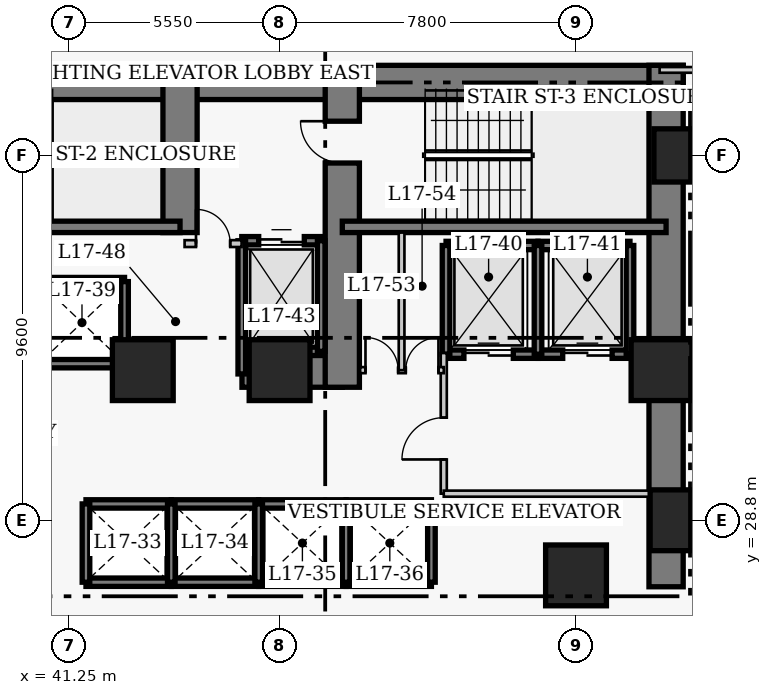
"""IFC4 building model, lengths in metres.
Left out: names, types, materials, properties, quantities, classifications, styles, units other than length and angle.
Written with IfcOpenShell. Run it as: python <this file> out.ifc"""

import sys

from ifc_helpers import new_model, si_unit, direction, frame, frame_2d, origin, origin_2d, place, context, subcontext, project, spatial, rectangle, extrude, element, fill, save


model = new_model("IFC4")
c1 = context("Model", 3, precision=1e-05, world=origin(), true_north=direction((0.0, 1.0)))
c2 = subcontext(c1, "Body", "Model", "MODEL_VIEW")
j1 = project(units=[si_unit("LENGTHUNIT", "METRE"), si_unit("PLANEANGLEUNIT", "RADIAN")], contexts=[c1])
p1 = place(None, origin())
s1 = spatial("IfcSite", under=j1, at=p1, CompositionType="ELEMENT")
p2 = place(p1, origin())
s2 = spatial("IfcBuilding", under=s1, at=p2, CompositionType="ELEMENT")
p3 = place(p2, frame((0.0, 0.0, 71.6)))
s3 = spatial("IfcBuildingStorey", under=s2, at=p3, CompositionType="ELEMENT", Elevation=71.6)
p4 = place(p3, frame((35.85, 40.32, 0.0), z_axis=(0.0, 0.0, 1.0), x_axis=(1.0, 0.0, 0.0)))
e1 = element("IfcWall", 1, at=p4, inside=s3, PredefinedType="SHEAR", context=c2, shape_type="SweptSolid", body=[
    extrude(rectangle(XDim=12.6, YDim=0.9, at=frame_2d((6.3, 0.0))), origin(), (0.0, 0.0, 1.0), 3.8),
])
p5 = place(p3, frame((48.45, 40.32, 0.0), z_axis=(0.0, 0.0, 1.0), x_axis=(1.0, 0.0, 0.0)))
e2 = element("IfcWall", 2, at=p5, inside=s3, PredefinedType="SHEAR", context=c2, shape_type="SweptSolid", body=[
    extrude(rectangle(XDim=8.97, YDim=0.9, at=frame_2d((4.485, 0.0))), origin(), (0.0, 0.0, 1.0), 3.8),
])
p6 = place(p3, frame((56.97, 27.05, 0.0), z_axis=(0.0, 0.0, 1.0), x_axis=(0.0, 1.0, 0.0)))
e3 = element("IfcWall", 3, at=p6, inside=s3, PredefinedType="SHEAR", context=c2, shape_type="SweptSolid", body=[
    extrude(rectangle(XDim=13.72, YDim=0.9, at=frame_2d((6.86, 0.0))), origin(), (0.0, 0.0, 1.0), 3.8),
])
p7 = place(p3, frame((45.81, 32.75, 0.0), z_axis=(0.0, 0.0, 1.0), x_axis=(1.0, 0.0, 0.0)))
e4 = element("IfcWall", 4, at=p7, inside=s3, PredefinedType="SHEAR", context=c2, shape_type="SweptSolid", body=[
    extrude(rectangle(XDim=2.64, YDim=0.9, at=frame_2d((1.32, 0.0))), origin(), (0.0, 0.0, 1.0), 3.8),
])
p8 = place(p3, frame((44.18, 36.37, 0.0), z_axis=(0.0, 0.0, 1.0), x_axis=(0.0, 1.0, 0.0)))
e5 = element("IfcWall", 5, at=p8, inside=s3, PredefinedType="SHEAR", context=c2, shape_type="SweptSolid", body=[
    extrude(rectangle(XDim=3.95, YDim=0.9, at=frame_2d((1.975, 0.0))), origin(), (0.0, 0.0, 1.0), 3.8),
])
p9 = place(p3, frame((48.45, 32.3, 0.0), z_axis=(0.0, 0.0, 1.0), x_axis=(0.0, 1.0, 0.0)))
e6 = element("IfcWall", 6, at=p9, inside=s3, PredefinedType="SHEAR", context=c2, shape_type="SweptSolid", body=[
    extrude(rectangle(XDim=8.02, YDim=0.9, at=frame_2d((4.01, 0.0))), origin(), (0.0, 0.0, 1.0), 3.8),
])
p10 = place(p9, frame((5.9, 0.0, 0.0)))
e7 = element("IfcOpeningElement", 7, at=p10, cuts=e6, PredefinedType="OPENING", context=c2, shape_type="SweptSolid", body=[
    extrude(rectangle(XDim=1.1, YDim=2.15, at=frame_2d((0.55, 1.075))), frame((0.0, 0.46, 0.0), z_axis=(0.0, -1.0, 0.0), x_axis=(1.0, 0.0, 0.0)), (0.0, 0.0, 1.0), 0.92),
])
p11 = place(p3, frame((35.85, 36.52, 0.0), z_axis=(0.0, 0.0, 1.0), x_axis=(1.0, 0.0, 0.0)))
e8 = element("IfcWall", 8, at=p11, inside=s3, PredefinedType="SHEAR", context=c2, shape_type="SweptSolid", body=[
    extrude(rectangle(XDim=8.33, YDim=0.3, at=frame_2d((4.165, 0.0))), origin(), (0.0, 0.0, 1.0), 3.8),
])
p12 = place(p3, frame((48.45, 36.52, 0.0), z_axis=(0.0, 0.0, 1.0), x_axis=(1.0, 0.0, 0.0)))
e9 = element("IfcWall", 9, at=p12, inside=s3, PredefinedType="SHEAR", context=c2, shape_type="SweptSolid", body=[
    extrude(rectangle(XDim=8.52, YDim=0.3, at=frame_2d((4.26, 0.0))), origin(), (0.0, 0.0, 1.0), 3.8),
])
p13 = place(p3, frame((57.35, 28.8, 0.0), z_axis=(0.0, 0.0, 1.0), x_axis=(1.0, 0.0, 0.0)))
e10 = element("IfcColumn", 10, at=p13, inside=s3, PredefinedType="COLUMN", context=c2, shape_type="SweptSolid", body=[
    extrude(rectangle(XDim=1.6, YDim=1.6, at=origin_2d()), origin(), (0.0, 0.0, 1.0), 3.8),
])
p14 = place(p3, frame((57.35, 38.4, 0.0), z_axis=(0.0, 0.0, 1.0), x_axis=(1.0, 0.0, 0.0)))
e11 = element("IfcColumn", 11, at=p14, inside=s3, PredefinedType="COLUMN", context=c2, shape_type="SweptSolid", body=[
    extrude(rectangle(XDim=1.4, YDim=1.4, at=origin_2d()), origin(), (0.0, 0.0, 1.0), 3.8),
])
for number, where, z_axis, x_axis in (
    (12, (43.2, 32.75, 0.0), (0.0, 0.0, 1.0), (1.0, 0.0, 0.0)),
    (13, (46.8, 32.75, 0.0), (0.0, 0.0, 1.0), (1.0, 0.0, 0.0)),
    (14, (54.6, 27.35, 0.0), (0.0, 0.0, 1.0), (1.0, 0.0, 0.0)),
    (15, (56.85, 32.75, 0.0), (0.0, 0.0, 1.0), (1.0, 0.0, 0.0)),
):
    element("IfcColumn", number, at=place(p3, frame(where, z_axis=z_axis, x_axis=x_axis)), inside=s3, PredefinedType="COLUMN", context=c2, shape_type="SweptSolid", body=[
        extrude(rectangle(XDim=1.6, YDim=1.6, at=origin_2d()), origin(), (0.0, 0.0, 1.0), 3.8),
    ])
for number, where, z_axis, x_axis in (
    (16, (41.705, 29.23, 0.0), (0.0, 0.0, 1.0), (1.0, 0.0, 0.0)),
    (17, (41.705, 27.17, 0.0), (0.0, 0.0, 1.0), (1.0, 0.0, 0.0)),
):
    element("IfcWall", number, at=place(p3, frame(where, z_axis=z_axis, x_axis=x_axis)), inside=s3, PredefinedType="SHEAR", context=c2, shape_type="SweptSolid", body=[
        extrude(rectangle(XDim=2.245, YDim=0.22, at=frame_2d((1.123, 0.0))), origin(), (0.0, 0.0, 1.0), 3.8),
    ])
p15 = place(p3, frame((41.705, 27.17, 0.0), z_axis=(0.0, 0.0, 1.0), x_axis=(0.0, 1.0, 0.0)))
e18 = element("IfcWall", 18, at=p15, inside=s3, PredefinedType="SHEAR", context=c2, shape_type="SweptSolid", body=[
    extrude(rectangle(XDim=2.06, YDim=0.2, at=frame_2d((1.03, 0.0))), origin(), (0.0, 0.0, 1.0), 3.8),
])
for number, where, z_axis, x_axis in (
    (19, (43.95, 29.23, 0.0), (0.0, 0.0, 1.0), (1.0, 0.0, 0.0)),
    (20, (43.95, 27.17, 0.0), (0.0, 0.0, 1.0), (1.0, 0.0, 0.0)),
):
    element("IfcWall", number, at=place(p3, frame(where, z_axis=z_axis, x_axis=x_axis)), inside=s3, PredefinedType="SHEAR", context=c2, shape_type="SweptSolid", body=[
        extrude(rectangle(XDim=2.3, YDim=0.22, at=frame_2d((1.15, 0.0))), origin(), (0.0, 0.0, 1.0), 3.8),
    ])
p16 = place(p3, frame((43.95, 27.17, 0.0), z_axis=(0.0, 0.0, 1.0), x_axis=(0.0, 1.0, 0.0)))
e21 = element("IfcWall", 21, at=p16, inside=s3, PredefinedType="SHEAR", context=c2, shape_type="SweptSolid", body=[
    extrude(rectangle(XDim=2.06, YDim=0.2, at=frame_2d((1.03, 0.0))), origin(), (0.0, 0.0, 1.0), 3.8),
])
for number, where, z_axis, x_axis in (
    (22, (46.25, 29.23, 0.0), (0.0, 0.0, 1.0), (1.0, 0.0, 0.0)),
    (23, (46.25, 27.17, 0.0), (0.0, 0.0, 1.0), (1.0, 0.0, 0.0)),
):
    element("IfcWall", number, at=place(p3, frame(where, z_axis=z_axis, x_axis=x_axis)), inside=s3, PredefinedType="SHEAR", context=c2, shape_type="SweptSolid", body=[
        extrude(rectangle(XDim=2.3, YDim=0.22, at=frame_2d((1.15, 0.0))), origin(), (0.0, 0.0, 1.0), 3.8),
    ])
p17 = place(p3, frame((46.25, 27.17, 0.0), z_axis=(0.0, 0.0, 1.0), x_axis=(0.0, 1.0, 0.0)))
e24 = element("IfcWall", 24, at=p17, inside=s3, PredefinedType="SHEAR", context=c2, shape_type="SweptSolid", body=[
    extrude(rectangle(XDim=2.06, YDim=0.2, at=frame_2d((1.03, 0.0))), origin(), (0.0, 0.0, 1.0), 3.8),
])
for number, where, z_axis, x_axis in (
    (25, (48.55, 29.23, 0.0), (0.0, 0.0, 1.0), (1.0, 0.0, 0.0)),
    (26, (48.55, 27.17, 0.0), (0.0, 0.0, 1.0), (1.0, 0.0, 0.0)),
):
    element("IfcWall", number, at=place(p3, frame(where, z_axis=z_axis, x_axis=x_axis)), inside=s3, PredefinedType="SHEAR", context=c2, shape_type="SweptSolid", body=[
        extrude(rectangle(XDim=2.245, YDim=0.22, at=frame_2d((1.123, 0.0))), origin(), (0.0, 0.0, 1.0), 3.8),
    ])
for number, where, z_axis, x_axis in (
    (27, (48.55, 27.17, 0.0), (0.0, 0.0, 1.0), (0.0, 1.0, 0.0)),
    (28, (50.795, 27.17, 0.0), (0.0, 0.0, 1.0), (0.0, 1.0, 0.0)),
):
    element("IfcWall", number, at=place(p3, frame(where, z_axis=z_axis, x_axis=x_axis)), inside=s3, PredefinedType="SHEAR", context=c2, shape_type="SweptSolid", body=[
        extrude(rectangle(XDim=2.06, YDim=0.2, at=frame_2d((1.03, 0.0))), origin(), (0.0, 0.0, 1.0), 3.8),
    ])
for number, where, z_axis, x_axis in (
    (29, (40.4, 35.08, 0.0), (0.0, 0.0, 1.0), (1.0, 0.0, 0.0)),
    (30, (40.4, 32.92, 0.0), (0.0, 0.0, 1.0), (1.0, 0.0, 0.0)),
):
    element("IfcWall", number, at=place(p3, frame(where, z_axis=z_axis, x_axis=x_axis)), inside=s3, PredefinedType="SHEAR", context=c2, shape_type="SweptSolid", body=[
        extrude(rectangle(XDim=2.32, YDim=0.22, at=frame_2d((1.16, 0.0))), origin(), (0.0, 0.0, 1.0), 3.8),
    ])
p18 = place(p3, frame((42.72, 32.92, 0.0), z_axis=(0.0, 0.0, 1.0), x_axis=(0.0, 1.0, 0.0)))
e31 = element("IfcWall", 31, at=p18, inside=s3, PredefinedType="SHEAR", context=c2, shape_type="SweptSolid", body=[
    extrude(rectangle(XDim=2.16, YDim=0.2, at=frame_2d((1.08, 0.0))), origin(), (0.0, 0.0, 1.0), 3.8),
])
p19 = place(p3, frame((51.18, 36.03, 0.0), z_axis=(0.0, 0.0, 1.0), x_axis=(1.0, 0.0, 0.0)))
e32 = element("IfcWall", 32, at=p19, inside=s3, PredefinedType="SHEAR", context=c2, shape_type="SweptSolid", body=[
    extrude(rectangle(XDim=2.42, YDim=0.22, at=frame_2d((1.21, 0.0))), origin(), (0.0, 0.0, 1.0), 3.8),
])
p20 = place(p3, frame((51.18, 33.17, 0.0), z_axis=(0.0, 0.0, 1.0), x_axis=(1.0, 0.0, 0.0)))
e33 = element("IfcWall", 33, at=p20, inside=s3, PredefinedType="SHEAR", context=c2, shape_type="SweptSolid", body=[
    extrude(rectangle(XDim=2.42, YDim=0.22, at=frame_2d((1.21, 0.0))), origin(), (0.0, 0.0, 1.0), 3.8),
])
p21 = place(p20, frame((0.47, 0.0, 0.0)))
e34 = element("IfcOpeningElement", 34, at=p21, cuts=e33, PredefinedType="OPENING", context=c2, shape_type="SweptSolid", body=[
    extrude(rectangle(XDim=1.3, YDim=2.15, at=frame_2d((0.65, 1.075))), frame((0.0, 0.12, 0.0), z_axis=(0.0, -1.0, 0.0), x_axis=(1.0, 0.0, 0.0)), (0.0, 0.0, 1.0), 0.24),
])
p22 = place(p3, frame((51.18, 33.17, 0.0), z_axis=(0.0, 0.0, 1.0), x_axis=(0.0, 1.0, 0.0)))
e35 = element("IfcWall", 35, at=p22, inside=s3, PredefinedType="SHEAR", context=c2, shape_type="SweptSolid", body=[
    extrude(rectangle(XDim=2.86, YDim=0.2, at=frame_2d((1.43, 0.0))), origin(), (0.0, 0.0, 1.0), 3.8),
])
p23 = place(p3, frame((53.6, 36.03, 0.0), z_axis=(0.0, 0.0, 1.0), x_axis=(1.0, 0.0, 0.0)))
e36 = element("IfcWall", 36, at=p23, inside=s3, PredefinedType="SHEAR", context=c2, shape_type="SweptSolid", body=[
    extrude(rectangle(XDim=2.42, YDim=0.22, at=frame_2d((1.21, 0.0))), origin(), (0.0, 0.0, 1.0), 3.8),
])
p24 = place(p3, frame((53.6, 33.17, 0.0), z_axis=(0.0, 0.0, 1.0), x_axis=(1.0, 0.0, 0.0)))
e37 = element("IfcWall", 37, at=p24, inside=s3, PredefinedType="SHEAR", context=c2, shape_type="SweptSolid", body=[
    extrude(rectangle(XDim=2.42, YDim=0.22, at=frame_2d((1.21, 0.0))), origin(), (0.0, 0.0, 1.0), 3.8),
])
p25 = place(p24, frame((0.65, 0.0, 0.0)))
e38 = element("IfcOpeningElement", 38, at=p25, cuts=e37, PredefinedType="OPENING", context=c2, shape_type="SweptSolid", body=[
    extrude(rectangle(XDim=1.3, YDim=2.15, at=frame_2d((0.65, 1.075))), frame((0.0, 0.12, 0.0), z_axis=(0.0, -1.0, 0.0), x_axis=(1.0, 0.0, 0.0)), (0.0, 0.0, 1.0), 0.24),
])
for number, where, z_axis, x_axis in (
    (39, (53.6, 33.17, 0.0), (0.0, 0.0, 1.0), (0.0, 1.0, 0.0)),
    (40, (56.02, 33.17, 0.0), (0.0, 0.0, 1.0), (0.0, 1.0, 0.0)),
):
    element("IfcWall", number, at=place(p3, frame(where, z_axis=z_axis, x_axis=x_axis)), inside=s3, PredefinedType="SHEAR", context=c2, shape_type="SweptSolid", body=[
        extrude(rectangle(XDim=2.86, YDim=0.2, at=frame_2d((1.43, 0.0))), origin(), (0.0, 0.0, 1.0), 3.8),
    ])
p26 = place(p3, frame((45.805, 36.155, 0.0), z_axis=(0.0, 0.0, 1.0), x_axis=(1.0, 0.0, 0.0)))
e41 = element("IfcWall", 41, at=p26, inside=s3, PredefinedType="SHEAR", context=c2, shape_type="SweptSolid", body=[
    extrude(rectangle(XDim=2.09, YDim=0.22, at=frame_2d((1.045, 0.0))), origin(), (0.0, 0.0, 1.0), 3.8),
])
p27 = place(p26, frame((0.445, 0.0, 0.0)))
e42 = element("IfcOpeningElement", 42, at=p27, cuts=e41, PredefinedType="OPENING", context=c2, shape_type="SweptSolid", body=[
    extrude(rectangle(XDim=1.2, YDim=2.15, at=frame_2d((0.6, 1.075))), frame((0.0, 0.12, 0.0), z_axis=(0.0, -1.0, 0.0), x_axis=(1.0, 0.0, 0.0)), (0.0, 0.0, 1.0), 0.24),
])
p28 = place(p3, frame((45.805, 33.245, 0.0), z_axis=(0.0, 0.0, 1.0), x_axis=(1.0, 0.0, 0.0)))
e43 = element("IfcWall", 43, at=p28, inside=s3, PredefinedType="SHEAR", context=c2, shape_type="SweptSolid", body=[
    extrude(rectangle(XDim=2.09, YDim=0.22, at=frame_2d((1.045, 0.0))), origin(), (0.0, 0.0, 1.0), 3.8),
])
p29 = place(p3, frame((45.805, 32.65, 0.0), z_axis=(0.0, 0.0, 1.0), x_axis=(0.0, 1.0, 0.0)))
e44 = element("IfcWall", 44, at=p29, inside=s3, PredefinedType="SHEAR", context=c2, shape_type="SweptSolid", body=[
    extrude(rectangle(XDim=3.505, YDim=0.2, at=frame_2d((1.752, 0.0))), origin(), (0.0, 0.0, 1.0), 3.8),
])
p30 = place(p3, frame((47.895, 33.245, 0.0), z_axis=(0.0, 0.0, 1.0), x_axis=(0.0, 1.0, 0.0)))
e45 = element("IfcWall", 45, at=p30, inside=s3, PredefinedType="SHEAR", context=c2, shape_type="SweptSolid", body=[
    extrude(rectangle(XDim=2.91, YDim=0.2, at=frame_2d((1.455, 0.0))), origin(), (0.0, 0.0, 1.0), 3.8),
])
p31 = place(p3, frame((44.3, 36.08, 0.0), z_axis=(0.0, 0.0, 1.0), x_axis=(1.0, 0.0, 0.0)))
e46 = element("IfcWall", 46, at=p31, inside=s3, PredefinedType="PARTITIONING", context=c2, shape_type="SweptSolid", body=[
    extrude(rectangle(XDim=1.5, YDim=0.18, at=frame_2d((0.75, 0.0))), origin(), (0.0, 0.0, 1.0), 3.42),
])
p32 = place(p31, frame((0.3, 0.0, 0.0)))
e47 = element("IfcOpeningElement", 47, at=p32, cuts=e46, PredefinedType="OPENING", context=c2, shape_type="SweptSolid", body=[
    extrude(rectangle(XDim=0.9, YDim=2.15, at=frame_2d((0.45, 1.075))), frame((0.0, 0.1, 0.0), z_axis=(0.0, -1.0, 0.0), x_axis=(1.0, 0.0, 0.0)), (0.0, 0.0, 1.0), 0.2),
])
p33 = place(p3, frame((51.12, 29.5, 0.0), z_axis=(0.0, 0.0, 1.0), x_axis=(0.0, 1.0, 0.0)))
e48 = element("IfcWall", 48, at=p33, inside=s3, PredefinedType="PARTITIONING", context=c2, shape_type="SweptSolid", body=[
    extrude(rectangle(XDim=3.7, YDim=0.16, at=frame_2d((1.85, 0.0))), origin(), (0.0, 0.0, 1.0), 3.42),
])
p34 = place(p33, frame((0.9, 0.0, 0.0)))
e49 = element("IfcOpeningElement", 49, at=p34, cuts=e48, PredefinedType="OPENING", context=c2, shape_type="SweptSolid", body=[
    extrude(rectangle(XDim=1.1, YDim=2.15, at=frame_2d((0.55, 1.075))), frame((0.0, 0.09, 0.0), z_axis=(0.0, -1.0, 0.0), x_axis=(1.0, 0.0, 0.0)), (0.0, 0.0, 1.0), 0.18),
])
p35 = place(p3, frame((51.12, 29.5, 0.0), z_axis=(0.0, 0.0, 1.0), x_axis=(1.0, 0.0, 0.0)))
e50 = element("IfcWall", 50, at=p35, inside=s3, PredefinedType="PARTITIONING", context=c2, shape_type="SweptSolid", body=[
    extrude(rectangle(XDim=5.63, YDim=0.16, at=frame_2d((2.815, 0.0))), origin(), (0.0, 0.0, 1.0), 3.42),
])
p36 = place(p3, frame((48.92, 32.75, 0.0), z_axis=(0.0, 0.0, 1.0), x_axis=(1.0, 0.0, 0.0)))
e51 = element("IfcWall", 51, at=p36, inside=s3, PredefinedType="PARTITIONING", context=c2, shape_type="SweptSolid", body=[
    extrude(rectangle(XDim=2.2, YDim=0.16, at=frame_2d((1.1, 0.0))), origin(), (0.0, 0.0, 1.0), 3.42),
])
p37 = place(p36, frame((0.14, 0.0, 0.0)))
e52 = element("IfcOpeningElement", 52, at=p37, cuts=e51, PredefinedType="OPENING", context=c2, shape_type="SweptSolid", body=[
    extrude(rectangle(XDim=0.86, YDim=2.05, at=frame_2d((0.43, 1.025))), frame((0.0, 0.09, 0.0), z_axis=(0.0, -1.0, 0.0), x_axis=(1.0, 0.0, 0.0)), (0.0, 0.0, 1.0), 0.18),
])
p38 = place(p36, frame((1.2, 0.0, 0.0)))
e53 = element("IfcOpeningElement", 53, at=p38, cuts=e51, PredefinedType="OPENING", context=c2, shape_type="SweptSolid", body=[
    extrude(rectangle(XDim=0.86, YDim=2.05, at=frame_2d((0.43, 1.025))), frame((0.0, 0.09, 0.0), z_axis=(0.0, -1.0, 0.0), x_axis=(1.0, 0.0, 0.0)), (0.0, 0.0, 1.0), 0.18),
])
p39 = place(p3, frame((50.01, 32.75, 0.0), z_axis=(0.0, 0.0, 1.0), x_axis=(0.0, 1.0, 0.0)))
e54 = element("IfcWall", 54, at=p39, inside=s3, PredefinedType="PARTITIONING", context=c2, shape_type="SweptSolid", body=[
    extrude(rectangle(XDim=3.62, YDim=0.15, at=frame_2d((1.81, 0.0))), origin(), (0.0, 0.0, 1.0), 3.42),
])
p40 = place(p3, frame((56.8, 40.65, 0.0), z_axis=(0.0, 0.0, 1.0), x_axis=(1.0, 0.0, 0.0)))
e55 = element("IfcWall", 55, at=p40, inside=s3, PredefinedType="PARTITIONING", context=c2, shape_type="SweptSolid", body=[
    extrude(rectangle(XDim=3.81, YDim=0.15, at=frame_2d((1.905, 0.0))), origin(), (0.0, 0.0, 1.0), 3.42),
])
p41 = place(p40, frame((2.2, 0.0, 0.0)))
e56 = element("IfcOpeningElement", 56, at=p41, cuts=e55, PredefinedType="OPENING", context=c2, shape_type="SweptSolid", body=[
    extrude(rectangle(XDim=1.0, YDim=2.15, at=frame_2d((0.5, 1.075))), frame((0.0, 0.085, 0.0), z_axis=(0.0, -1.0, 0.0), x_axis=(1.0, 0.0, 0.0)), (0.0, 0.0, 1.0), 0.17),
])
p42 = place(p21, origin())
e57 = element("IfcDoor", 57, at=p42, inside=s3, OperationType="DOUBLE_DOOR_SLIDING", PredefinedType="DOOR", context=c2, shape_type="SweptSolid", body=[
    extrude(rectangle(XDim=1.3, YDim=2.15, at=frame_2d((0.65, 1.075))), frame((0.0, 0.025, 0.0), z_axis=(0.0, -1.0, 0.0), x_axis=(1.0, 0.0, 0.0)), (0.0, 0.0, 1.0), 0.05),
])
fill(e34, e57)
p43 = place(p25, origin())
e58 = element("IfcDoor", 58, at=p43, inside=s3, OperationType="DOUBLE_DOOR_SLIDING", PredefinedType="DOOR", context=c2, shape_type="SweptSolid", body=[
    extrude(rectangle(XDim=1.3, YDim=2.15, at=frame_2d((0.65, 1.075))), frame((0.0, 0.025, 0.0), z_axis=(0.0, -1.0, 0.0), x_axis=(1.0, 0.0, 0.0)), (0.0, 0.0, 1.0), 0.05),
])
fill(e38, e58)
p44 = place(p27, origin())
e59 = element("IfcDoor", 59, at=p44, inside=s3, OperationType="DOUBLE_DOOR_SLIDING", PredefinedType="DOOR", context=c2, shape_type="SweptSolid", body=[
    extrude(rectangle(XDim=1.2, YDim=2.15, at=frame_2d((0.6, 1.075))), frame((0.0, 0.025, 0.0), z_axis=(0.0, -1.0, 0.0), x_axis=(1.0, 0.0, 0.0)), (0.0, 0.0, 1.0), 0.05),
])
fill(e42, e59)
p45 = place(p32, origin())
e60 = element("IfcDoor", 60, at=p45, inside=s3, OperationType="SINGLE_SWING_LEFT", PredefinedType="DOOR", context=c2, shape_type="SweptSolid", body=[
    extrude(rectangle(XDim=0.9, YDim=2.15, at=frame_2d((0.45, 1.075))), frame((0.0, 0.025, 0.0), z_axis=(0.0, -1.0, 0.0), x_axis=(1.0, 0.0, 0.0)), (0.0, 0.0, 1.0), 0.05),
])
fill(e47, e60)
p46 = place(p34, origin())
e61 = element("IfcDoor", 61, at=p46, inside=s3, OperationType="SINGLE_SWING_LEFT", PredefinedType="DOOR", context=c2, shape_type="SweptSolid", body=[
    extrude(rectangle(XDim=1.1, YDim=2.15, at=frame_2d((0.55, 1.075))), frame((0.0, 0.025, 0.0), z_axis=(0.0, -1.0, 0.0), x_axis=(1.0, 0.0, 0.0)), (0.0, 0.0, 1.0), 0.05),
])
fill(e49, e61)
p47 = place(p37, origin())
e62 = element("IfcDoor", 62, at=p47, inside=s3, OperationType="SINGLE_SWING_LEFT", PredefinedType="DOOR", context=c2, shape_type="SweptSolid", body=[
    extrude(rectangle(XDim=0.86, YDim=2.05, at=frame_2d((0.43, 1.025))), frame((0.0, 0.025, 0.0), z_axis=(0.0, -1.0, 0.0), x_axis=(1.0, 0.0, 0.0)), (0.0, 0.0, 1.0), 0.05),
])
fill(e52, e62)
p48 = place(p38, origin())
e63 = element("IfcDoor", 63, at=p48, inside=s3, OperationType="SINGLE_SWING_RIGHT", PredefinedType="DOOR", context=c2, shape_type="SweptSolid", body=[
    extrude(rectangle(XDim=0.86, YDim=2.05, at=frame_2d((0.43, 1.025))), frame((0.0, 0.025, 0.0), z_axis=(0.0, -1.0, 0.0), x_axis=(1.0, 0.0, 0.0)), (0.0, 0.0, 1.0), 0.05),
])
fill(e53, e63)
p49 = place(p10, origin())
e64 = element("IfcDoor", 64, at=p49, inside=s3, OperationType="SINGLE_SWING_RIGHT", PredefinedType="DOOR", context=c2, shape_type="SweptSolid", body=[
    extrude(rectangle(XDim=1.1, YDim=2.15, at=frame_2d((0.55, 1.075))), frame((0.0, 0.025, 0.0), z_axis=(0.0, -1.0, 0.0), x_axis=(1.0, 0.0, 0.0)), (0.0, 0.0, 1.0), 0.05),
])
fill(e7, e64)
save(model, sys.argv[1])
